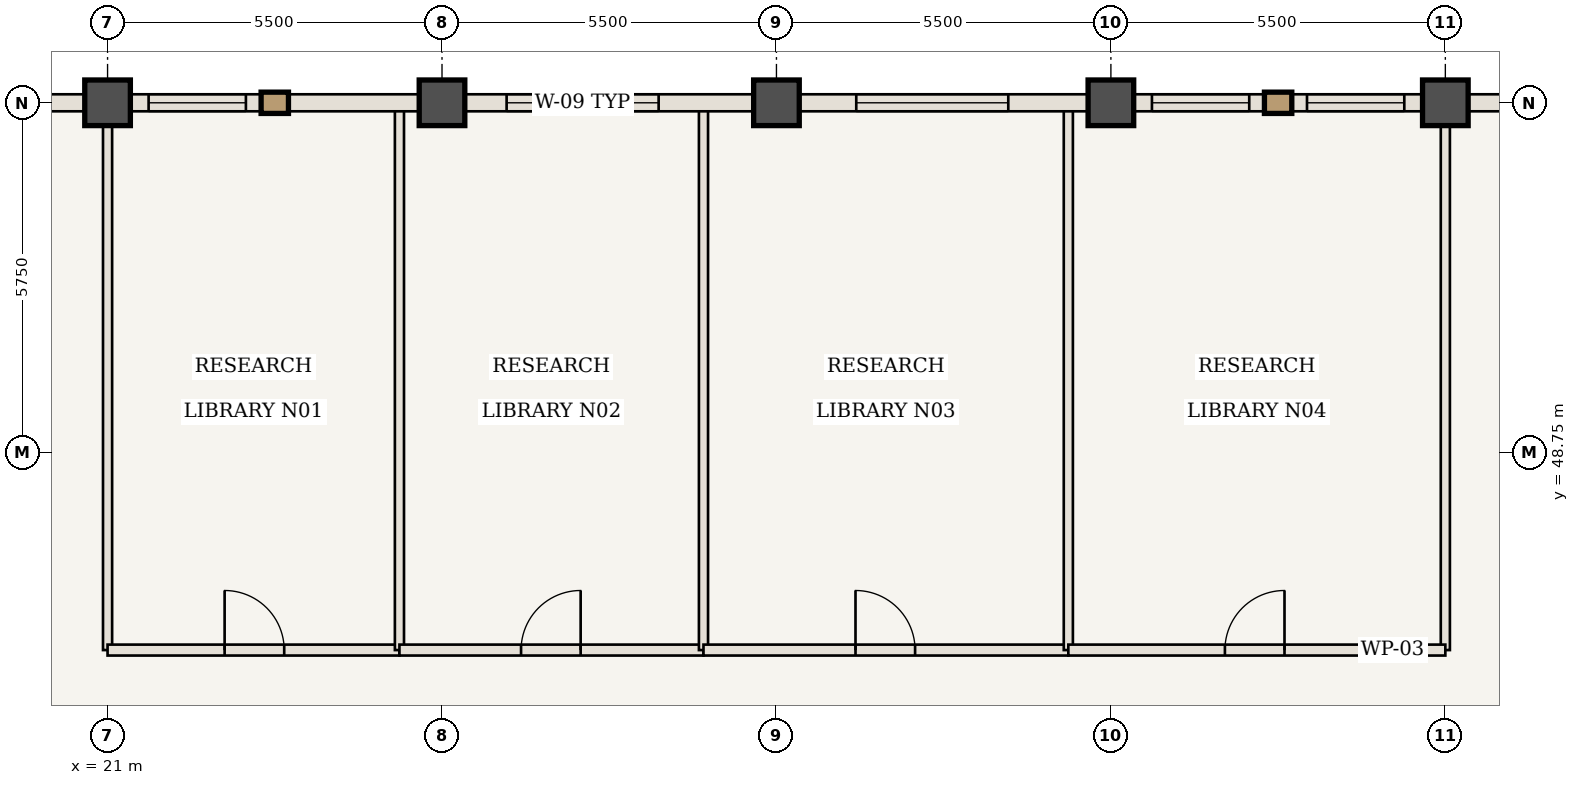
"""IFC4 building model, lengths in metres.
Left out: names, types, materials, properties, quantities, classifications, styles, units other than length and angle.
Written with IfcOpenShell. Run it as: python <this file> out.ifc"""

import sys

from ifc_helpers import new_model, si_unit, direction, frame, frame_2d, origin, origin_2d, place, context, subcontext, project, spatial, rectangle, extrude, element, fill, save


model = new_model("IFC4")
c1 = context("Model", 3, precision=1e-05, world=origin(), true_north=direction((0.0, 1.0)))
c2 = subcontext(c1, "Body", "Model", "MODEL_VIEW")
j1 = project(units=[si_unit("LENGTHUNIT", "METRE"), si_unit("PLANEANGLEUNIT", "RADIAN")], contexts=[c1])
p1 = place(None, origin())
s1 = spatial("IfcSite", under=j1, at=p1, CompositionType="ELEMENT")
p2 = place(p1, origin())
s2 = spatial("IfcBuilding", under=s1, at=p2, CompositionType="ELEMENT")
p3 = place(p2, frame((0.0, 0.0, 292.95)))
s3 = spatial("IfcBuildingStorey", under=s2, at=p3, CompositionType="ELEMENT", Elevation=292.95)
for number, where, z_axis, x_axis in (
    (1, (21.0, 54.5, 0.0), (0.0, 0.0, 1.0), (1.0, 0.0, 0.0)),
    (2, (26.5, 54.5, 0.0), (0.0, 0.0, 1.0), (1.0, 0.0, 0.0)),
    (3, (32.0, 54.5, 0.0), (0.0, 0.0, 1.0), (1.0, 0.0, 0.0)),
    (4, (37.5, 54.5, 0.0), (0.0, 0.0, 1.0), (1.0, 0.0, 0.0)),
    (5, (43.0, 54.5, 0.0), (0.0, 0.0, 1.0), (1.0, 0.0, 0.0)),
):
    element("IfcColumn", number, at=place(p3, frame(where, z_axis=z_axis, x_axis=x_axis)), inside=s3, PredefinedType="COLUMN", context=c2, shape_type="SweptSolid", body=[
        extrude(rectangle(XDim=0.75, YDim=0.75, at=origin_2d()), origin(), (0.0, 0.0, 1.0), 3.85),
    ])
for number, where, z_axis, x_axis in (
    (6, (21.0, 45.5, 0.0), (0.0, 0.0, 1.0), (0.0, 1.0, 0.0)),
    (7, (43.0, 45.5, 0.0), (0.0, 0.0, 1.0), (0.0, 1.0, 0.0)),
):
    element("IfcWall", number, at=place(p3, frame(where, z_axis=z_axis, x_axis=x_axis)), inside=s3, PredefinedType="STANDARD", context=c2, shape_type="SweptSolid", body=[
        extrude(rectangle(XDim=8.94, YDim=0.15, at=frame_2d((4.47, 0.0))), origin(), (0.0, 0.0, 1.0), 3.685),
    ])
p4 = place(p3, frame((21.0, 45.5, 0.0), z_axis=(0.0, 0.0, 1.0), x_axis=(1.0, 0.0, 0.0)))
e8 = element("IfcWall", 8, at=p4, inside=s3, PredefinedType="STANDARD", context=c2, shape_type="SweptSolid", body=[
    extrude(rectangle(XDim=4.8, YDim=0.18, at=frame_2d((2.4, 0.0))), origin(), (0.0, 0.0, 1.0), 3.685),
])
p5 = place(p4, frame((1.925, 0.0, 0.0)))
e9 = element("IfcOpeningElement", 9, at=p5, cuts=e8, PredefinedType="OPENING", context=c2, shape_type="SweptSolid", body=[
    extrude(rectangle(XDim=0.98, YDim=2.2, at=frame_2d((0.49, 1.1))), frame((0.0, 0.1, 0.0), z_axis=(0.0, -1.0, 0.0), x_axis=(1.0, 0.0, 0.0)), (0.0, 0.0, 1.0), 0.2),
])
p6 = place(p3, frame((25.8, 45.5, 0.0), z_axis=(0.0, 0.0, 1.0), x_axis=(0.0, 1.0, 0.0)))
e10 = element("IfcWall", 10, at=p6, inside=s3, PredefinedType="STANDARD", context=c2, shape_type="SweptSolid", body=[
    extrude(rectangle(XDim=8.94, YDim=0.15, at=frame_2d((4.47, 0.0))), origin(), (0.0, 0.0, 1.0), 3.685),
])
p7 = place(p3, frame((25.8, 45.5, 0.0), z_axis=(0.0, 0.0, 1.0), x_axis=(1.0, 0.0, 0.0)))
e11 = element("IfcWall", 11, at=p7, inside=s3, PredefinedType="STANDARD", context=c2, shape_type="SweptSolid", body=[
    extrude(rectangle(XDim=5.0, YDim=0.18, at=frame_2d((2.5, 0.0))), origin(), (0.0, 0.0, 1.0), 3.685),
])
p8 = place(p7, frame((2.0, 0.0, 0.0)))
e12 = element("IfcOpeningElement", 12, at=p8, cuts=e11, PredefinedType="OPENING", context=c2, shape_type="SweptSolid", body=[
    extrude(rectangle(XDim=0.98, YDim=2.2, at=frame_2d((0.49, 1.1))), frame((0.0, 0.1, 0.0), z_axis=(0.0, -1.0, 0.0), x_axis=(1.0, 0.0, 0.0)), (0.0, 0.0, 1.0), 0.2),
])
p9 = place(p3, frame((30.8, 45.5, 0.0), z_axis=(0.0, 0.0, 1.0), x_axis=(0.0, 1.0, 0.0)))
e13 = element("IfcWall", 13, at=p9, inside=s3, PredefinedType="STANDARD", context=c2, shape_type="SweptSolid", body=[
    extrude(rectangle(XDim=8.94, YDim=0.15, at=frame_2d((4.47, 0.0))), origin(), (0.0, 0.0, 1.0), 3.685),
])
p10 = place(p3, frame((30.8, 45.5, 0.0), z_axis=(0.0, 0.0, 1.0), x_axis=(1.0, 0.0, 0.0)))
e14 = element("IfcWall", 14, at=p10, inside=s3, PredefinedType="STANDARD", context=c2, shape_type="SweptSolid", body=[
    extrude(rectangle(XDim=6.0, YDim=0.18, at=frame_2d((3.0, 0.0))), origin(), (0.0, 0.0, 1.0), 3.685),
])
p11 = place(p10, frame((2.5, 0.0, 0.0)))
e15 = element("IfcOpeningElement", 15, at=p11, cuts=e14, PredefinedType="OPENING", context=c2, shape_type="SweptSolid", body=[
    extrude(rectangle(XDim=0.98, YDim=2.2, at=frame_2d((0.49, 1.1))), frame((0.0, 0.1, 0.0), z_axis=(0.0, -1.0, 0.0), x_axis=(1.0, 0.0, 0.0)), (0.0, 0.0, 1.0), 0.2),
])
p12 = place(p3, frame((36.8, 45.5, 0.0), z_axis=(0.0, 0.0, 1.0), x_axis=(0.0, 1.0, 0.0)))
e16 = element("IfcWall", 16, at=p12, inside=s3, PredefinedType="STANDARD", context=c2, shape_type="SweptSolid", body=[
    extrude(rectangle(XDim=8.94, YDim=0.15, at=frame_2d((4.47, 0.0))), origin(), (0.0, 0.0, 1.0), 3.685),
])
p13 = place(p3, frame((36.8, 45.5, 0.0), z_axis=(0.0, 0.0, 1.0), x_axis=(1.0, 0.0, 0.0)))
e17 = element("IfcWall", 17, at=p13, inside=s3, PredefinedType="STANDARD", context=c2, shape_type="SweptSolid", body=[
    extrude(rectangle(XDim=6.2, YDim=0.18, at=frame_2d((3.1, 0.0))), origin(), (0.0, 0.0, 1.0), 3.685),
])
p14 = place(p13, frame((2.575, 0.0, 0.0)))
e18 = element("IfcOpeningElement", 18, at=p14, cuts=e17, PredefinedType="OPENING", context=c2, shape_type="SweptSolid", body=[
    extrude(rectangle(XDim=0.98, YDim=2.2, at=frame_2d((0.49, 1.1))), frame((0.0, 0.1, 0.0), z_axis=(0.0, -1.0, 0.0), x_axis=(1.0, 0.0, 0.0)), (0.0, 0.0, 1.0), 0.2),
])
p15 = place(p3, frame((15.5, 54.5, 0.0), z_axis=(0.0, 0.0, 1.0), x_axis=(1.0, 0.0, 0.0)))
e19 = element("IfcWall", 19, at=p15, inside=s3, PredefinedType="USERDEFINED", context=c2, shape_type="SweptSolid", body=[
    extrude(rectangle(XDim=5.5, YDim=0.28, at=frame_2d((2.75, 0.0))), origin(), (0.0, 0.0, 1.0), 2.985),
])
p16 = place(p3, frame((21.0, 54.5, 0.0), z_axis=(0.0, 0.0, 1.0), x_axis=(1.0, 0.0, 0.0)))
e20 = element("IfcWall", 20, at=p16, inside=s3, PredefinedType="USERDEFINED", context=c2, shape_type="SweptSolid", body=[
    extrude(rectangle(XDim=5.5, YDim=0.28, at=frame_2d((2.75, 0.0))), origin(), (0.0, 0.0, 1.0), 2.985),
])
p17 = place(p16, frame((0.675, 0.0, 0.85)))
e21 = element("IfcOpeningElement", 21, at=p17, cuts=e20, PredefinedType="OPENING", context=c2, shape_type="SweptSolid", body=[
    extrude(rectangle(XDim=1.6, YDim=1.935, at=frame_2d((0.8, 0.968))), frame((0.0, 0.15, 0.0), z_axis=(0.0, -1.0, 0.0), x_axis=(1.0, 0.0, 0.0)), (0.0, 0.0, 1.0), 0.3),
])
p18 = place(p3, frame((26.5, 54.5, 0.0), z_axis=(0.0, 0.0, 1.0), x_axis=(1.0, 0.0, 0.0)))
e22 = element("IfcWall", 22, at=p18, inside=s3, PredefinedType="USERDEFINED", context=c2, shape_type="SweptSolid", body=[
    extrude(rectangle(XDim=5.5, YDim=0.28, at=frame_2d((2.75, 0.0))), origin(), (0.0, 0.0, 1.0), 2.985),
])
p19 = place(p18, frame((1.062, 0.0, 0.85)))
e23 = element("IfcOpeningElement", 23, at=p19, cuts=e22, PredefinedType="OPENING", context=c2, shape_type="SweptSolid", body=[
    extrude(rectangle(XDim=2.5, YDim=1.935, at=frame_2d((1.25, 0.968))), frame((0.0, 0.15, 0.0), z_axis=(0.0, -1.0, 0.0), x_axis=(1.0, 0.0, 0.0)), (0.0, 0.0, 1.0), 0.3),
])
p20 = place(p3, frame((32.0, 54.5, 0.0), z_axis=(0.0, 0.0, 1.0), x_axis=(1.0, 0.0, 0.0)))
e24 = element("IfcWall", 24, at=p20, inside=s3, PredefinedType="USERDEFINED", context=c2, shape_type="SweptSolid", body=[
    extrude(rectangle(XDim=5.5, YDim=0.28, at=frame_2d((2.75, 0.0))), origin(), (0.0, 0.0, 1.0), 2.985),
])
p21 = place(p20, frame((1.312, 0.0, 0.85)))
e25 = element("IfcOpeningElement", 25, at=p21, cuts=e24, PredefinedType="OPENING", context=c2, shape_type="SweptSolid", body=[
    extrude(rectangle(XDim=2.5, YDim=1.935, at=frame_2d((1.25, 0.968))), frame((0.0, 0.15, 0.0), z_axis=(0.0, -1.0, 0.0), x_axis=(1.0, 0.0, 0.0)), (0.0, 0.0, 1.0), 0.3),
])
p22 = place(p3, frame((37.5, 54.5, 0.0), z_axis=(0.0, 0.0, 1.0), x_axis=(1.0, 0.0, 0.0)))
e26 = element("IfcWall", 26, at=p22, inside=s3, PredefinedType="USERDEFINED", context=c2, shape_type="SweptSolid", body=[
    extrude(rectangle(XDim=5.5, YDim=0.28, at=frame_2d((2.75, 0.0))), origin(), (0.0, 0.0, 1.0), 2.985),
])
p23 = place(p22, frame((0.675, 0.0, 0.85)))
e27 = element("IfcOpeningElement", 27, at=p23, cuts=e26, PredefinedType="OPENING", context=c2, shape_type="SweptSolid", body=[
    extrude(rectangle(XDim=1.6, YDim=1.935, at=frame_2d((0.8, 0.968))), frame((0.0, 0.15, 0.0), z_axis=(0.0, -1.0, 0.0), x_axis=(1.0, 0.0, 0.0)), (0.0, 0.0, 1.0), 0.3),
])
p24 = place(p22, frame((3.225, 0.0, 0.85)))
e28 = element("IfcOpeningElement", 28, at=p24, cuts=e26, PredefinedType="OPENING", context=c2, shape_type="SweptSolid", body=[
    extrude(rectangle(XDim=1.6, YDim=1.935, at=frame_2d((0.8, 0.968))), frame((0.0, 0.15, 0.0), z_axis=(0.0, -1.0, 0.0), x_axis=(1.0, 0.0, 0.0)), (0.0, 0.0, 1.0), 0.3),
])
p25 = place(p3, frame((43.0, 54.5, 0.0), z_axis=(0.0, 0.0, 1.0), x_axis=(1.0, 0.0, 0.0)))
e29 = element("IfcWall", 29, at=p25, inside=s3, PredefinedType="USERDEFINED", context=c2, shape_type="SweptSolid", body=[
    extrude(rectangle(XDim=5.5, YDim=0.28, at=frame_2d((2.75, 0.0))), origin(), (0.0, 0.0, 1.0), 2.985),
])
p26 = place(p5, origin())
e30 = element("IfcDoor", 30, at=p26, inside=s3, OperationType="SINGLE_SWING_LEFT", PredefinedType="DOOR", context=c2, shape_type="SweptSolid", body=[
    extrude(rectangle(XDim=0.98, YDim=2.2, at=frame_2d((0.49, 1.1))), frame((0.0, 0.025, 0.0), z_axis=(0.0, -1.0, 0.0), x_axis=(1.0, 0.0, 0.0)), (0.0, 0.0, 1.0), 0.05),
])
fill(e9, e30)
p27 = place(p8, origin())
e31 = element("IfcDoor", 31, at=p27, inside=s3, OperationType="SINGLE_SWING_RIGHT", PredefinedType="DOOR", context=c2, shape_type="SweptSolid", body=[
    extrude(rectangle(XDim=0.98, YDim=2.2, at=frame_2d((0.49, 1.1))), frame((0.0, 0.025, 0.0), z_axis=(0.0, -1.0, 0.0), x_axis=(1.0, 0.0, 0.0)), (0.0, 0.0, 1.0), 0.05),
])
fill(e12, e31)
p28 = place(p11, origin())
e32 = element("IfcDoor", 32, at=p28, inside=s3, OperationType="SINGLE_SWING_LEFT", PredefinedType="DOOR", context=c2, shape_type="SweptSolid", body=[
    extrude(rectangle(XDim=0.98, YDim=2.2, at=frame_2d((0.49, 1.1))), frame((0.0, 0.025, 0.0), z_axis=(0.0, -1.0, 0.0), x_axis=(1.0, 0.0, 0.0)), (0.0, 0.0, 1.0), 0.05),
])
fill(e15, e32)
p29 = place(p14, origin())
e33 = element("IfcDoor", 33, at=p29, inside=s3, OperationType="SINGLE_SWING_RIGHT", PredefinedType="DOOR", context=c2, shape_type="SweptSolid", body=[
    extrude(rectangle(XDim=0.98, YDim=2.2, at=frame_2d((0.49, 1.1))), frame((0.0, 0.025, 0.0), z_axis=(0.0, -1.0, 0.0), x_axis=(1.0, 0.0, 0.0)), (0.0, 0.0, 1.0), 0.05),
])
fill(e18, e33)
p30 = place(p17, origin())
e34 = element("IfcWindow", 34, at=p30, inside=s3, PartitioningType="SINGLE_PANEL", PredefinedType="WINDOW", context=c2, shape_type="SweptSolid", body=[
    extrude(rectangle(XDim=1.6, YDim=1.935, at=frame_2d((0.8, 0.968))), frame((0.0, 0.03, 0.0), z_axis=(0.0, -1.0, 0.0), x_axis=(1.0, 0.0, 0.0)), (0.0, 0.0, 1.0), 0.06),
])
fill(e21, e34)
p31 = place(p19, origin())
e35 = element("IfcWindow", 35, at=p31, inside=s3, PartitioningType="SINGLE_PANEL", PredefinedType="WINDOW", context=c2, shape_type="SweptSolid", body=[
    extrude(rectangle(XDim=2.5, YDim=1.935, at=frame_2d((1.25, 0.968))), frame((0.0, 0.03, 0.0), z_axis=(0.0, -1.0, 0.0), x_axis=(1.0, 0.0, 0.0)), (0.0, 0.0, 1.0), 0.06),
])
fill(e23, e35)
p32 = place(p21, origin())
e36 = element("IfcWindow", 36, at=p32, inside=s3, PartitioningType="SINGLE_PANEL", PredefinedType="WINDOW", context=c2, shape_type="SweptSolid", body=[
    extrude(rectangle(XDim=2.5, YDim=1.935, at=frame_2d((1.25, 0.968))), frame((0.0, 0.03, 0.0), z_axis=(0.0, -1.0, 0.0), x_axis=(1.0, 0.0, 0.0)), (0.0, 0.0, 1.0), 0.06),
])
fill(e25, e36)
p33 = place(p23, origin())
e37 = element("IfcWindow", 37, at=p33, inside=s3, PartitioningType="SINGLE_PANEL", PredefinedType="WINDOW", context=c2, shape_type="SweptSolid", body=[
    extrude(rectangle(XDim=1.6, YDim=1.935, at=frame_2d((0.8, 0.968))), frame((0.0, 0.03, 0.0), z_axis=(0.0, -1.0, 0.0), x_axis=(1.0, 0.0, 0.0)), (0.0, 0.0, 1.0), 0.06),
])
fill(e27, e37)
p34 = place(p24, origin())
e38 = element("IfcWindow", 38, at=p34, inside=s3, PartitioningType="SINGLE_PANEL", PredefinedType="WINDOW", context=c2, shape_type="SweptSolid", body=[
    extrude(rectangle(XDim=1.6, YDim=1.935, at=frame_2d((0.8, 0.968))), frame((0.0, 0.03, 0.0), z_axis=(0.0, -1.0, 0.0), x_axis=(1.0, 0.0, 0.0)), (0.0, 0.0, 1.0), 0.06),
])
fill(e28, e38)
save(model, sys.argv[1])
